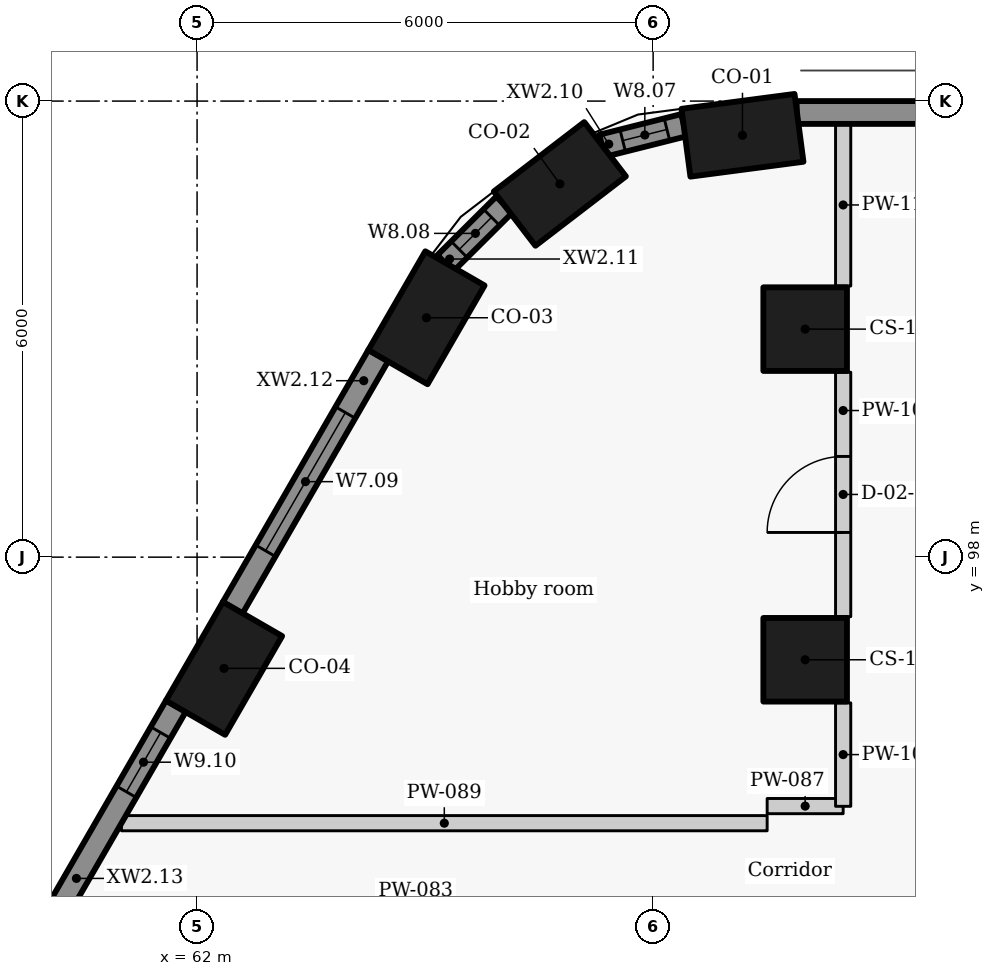
"""IFC4 building model, lengths in metres.
Left out: names, types, materials, properties, quantities, classifications, styles, units other than length and angle.
Written with IfcOpenShell. Run it as: python <this file> out.ifc"""

import sys

from ifc_helpers import new_model, si_unit, direction, frame, frame_2d, origin, origin_2d, place, context, subcontext, project, spatial, rectangle, extrude, element, fill, save


model = new_model("IFC4")
c1 = context("Model", 3, precision=1e-05, world=origin(), true_north=direction((0.0, 1.0)))
c2 = subcontext(c1, "Body", "Model", "MODEL_VIEW")
j1 = project(units=[si_unit("LENGTHUNIT", "METRE"), si_unit("PLANEANGLEUNIT", "RADIAN")], contexts=[c1])
p1 = place(None, origin())
s1 = spatial("IfcSite", under=j1, at=p1, CompositionType="ELEMENT")
p2 = place(p1, origin())
s2 = spatial("IfcBuilding", under=s1, at=p2, CompositionType="ELEMENT")
p3 = place(p2, frame((0.0, 0.0, 51.3)))
s3 = spatial("IfcBuildingStorey", under=s2, at=p3, CompositionType="ELEMENT", Elevation=51.3)
for number, where, z_axis, x_axis in (
    (1, (69.175, 103.55, 0.0), (0.0, 0.0, 1.0), (-0.991, -0.131, 0.0)),
    (2, (66.773, 102.91, 0.0), (0.0, 0.0, 1.0), (-0.793, -0.609, 0.0)),
    (3, (65.018, 101.149, 0.0), (0.0, 0.0, 1.0), (-0.5, -0.866, 0.0)),
    (4, (62.354, 96.537, 0.0), (0.0, 0.0, 1.0), (-0.5, -0.866, 0.0)),
):
    element("IfcColumn", number, at=place(p3, frame(where, z_axis=z_axis, x_axis=x_axis)), inside=s3, PredefinedType="COLUMN", context=c2, shape_type="SweptSolid", body=[
        extrude(rectangle(XDim=1.5, YDim=0.9, at=origin_2d()), origin(), (0.0, 0.0, 1.0), 3.3),
    ])
for number, where, z_axis, x_axis in (
    (5, (70.0, 101.0, 0.0), (0.0, 0.0, 1.0), (0.0, -1.0, 0.0)),
    (6, (70.0, 96.65, 0.0), (0.0, 0.0, 1.0), (0.0, -1.0, 0.0)),
):
    element("IfcColumn", number, at=place(p3, frame(where, z_axis=z_axis, x_axis=x_axis)), inside=s3, PredefinedType="COLUMN", context=c2, shape_type="SweptSolid", body=[
        extrude(rectangle(XDim=1.1, YDim=1.1, at=origin_2d()), origin(), (0.0, 0.0, 1.0), 3.3),
    ])
p4 = place(p3, frame((90.079, 103.85, 0.0), z_axis=(0.0, 0.0, 1.0), x_axis=(-1.0, 0.0, 0.0)))
e7 = element("IfcWall", 7, at=p4, inside=s3, PredefinedType="SOLIDWALL", context=c2, shape_type="SweptSolid", body=[
    extrude(rectangle(XDim=20.19, YDim=0.3, at=frame_2d((10.095, 0.0))), origin(), (0.0, 0.0, 1.0), 2.425),
])
p5 = place(p3, frame((68.405, 103.683, 0.0), z_axis=(0.0, 0.0, 1.0), x_axis=(-0.969766298956, -0.244035500304, 0.0)))
e8 = element("IfcWall", 8, at=p5, inside=s3, PredefinedType="SOLIDWALL", context=c2, shape_type="SweptSolid", body=[
    extrude(rectangle(XDim=1.111, YDim=0.3, at=frame_2d((0.555, 0.0))), origin(), (0.0, 0.0, 1.0), 2.425),
])
p6 = place(p5, frame((0.231, 0.0, 0.9)))
e9 = element("IfcOpeningElement", 9, at=p6, cuts=e8, PredefinedType="OPENING", context=c2, shape_type="SweptSolid", body=[
    extrude(rectangle(XDim=0.6, YDim=1.1, at=frame_2d((0.3, 0.55))), frame((0.0, 0.16, 0.0), z_axis=(0.0, -1.0, 0.0), x_axis=(1.0, 0.0, 0.0)), (0.0, 0.0, 1.0), 0.32),
])
p7 = place(p3, frame((66.042, 102.637, 0.0), z_axis=(0.0, 0.0, 1.0), x_axis=(-0.708892395813, -0.705316646024, 0.0)))
e10 = element("IfcWall", 10, at=p7, inside=s3, PredefinedType="SOLIDWALL", context=c2, shape_type="SweptSolid", body=[
    extrude(rectangle(XDim=1.093, YDim=0.3, at=frame_2d((0.546, 0.0))), origin(), (0.0, 0.0, 1.0), 2.425),
])
p8 = place(p7, frame((0.236, 0.0, 0.9)))
e11 = element("IfcOpeningElement", 11, at=p8, cuts=e10, PredefinedType="OPENING", context=c2, shape_type="SweptSolid", body=[
    extrude(rectangle(XDim=0.6, YDim=1.1, at=frame_2d((0.3, 0.55))), frame((0.0, 0.16, 0.0), z_axis=(0.0, -1.0, 0.0), x_axis=(1.0, 0.0, 0.0)), (0.0, 0.0, 1.0), 0.32),
])
p9 = place(p3, frame((64.385, 100.654, 0.0), z_axis=(0.0, 0.0, 1.0), x_axis=(-0.499974163209, -0.866040320149, 0.0)))
e12 = element("IfcWall", 12, at=p9, inside=s3, PredefinedType="SOLIDWALL", context=c2, shape_type="SweptSolid", body=[
    extrude(rectangle(XDim=3.834, YDim=0.3, at=frame_2d((1.917, 0.0))), origin(), (0.0, 0.0, 1.0), 2.425),
])
p10 = place(p9, frame((0.867, 0.0, 0.9)))
e13 = element("IfcOpeningElement", 13, at=p10, cuts=e12, PredefinedType="OPENING", context=c2, shape_type="SweptSolid", body=[
    extrude(rectangle(XDim=2.1, YDim=1.1, at=frame_2d((1.05, 0.55))), frame((0.0, 0.16, 0.0), z_axis=(0.0, -1.0, 0.0), x_axis=(1.0, 0.0, 0.0)), (0.0, 0.0, 1.0), 0.32),
])
p11 = place(p3, frame((61.722, 96.041, 0.0), z_axis=(0.0, 0.0, 1.0), x_axis=(-0.500001735503, -0.866024401789, 0.0)))
e14 = element("IfcWall", 14, at=p11, inside=s3, PredefinedType="SOLIDWALL", context=c2, shape_type="SweptSolid", body=[
    extrude(rectangle(XDim=3.834, YDim=0.3, at=frame_2d((1.917, 0.0))), origin(), (0.0, 0.0, 1.0), 2.425),
])
p12 = place(p11, frame((0.403, 0.0, 0.9)))
e15 = element("IfcOpeningElement", 15, at=p12, cuts=e14, PredefinedType="OPENING", context=c2, shape_type="SweptSolid", body=[
    extrude(rectangle(XDim=0.9, YDim=1.1, at=frame_2d((0.45, 0.55))), frame((0.0, 0.16, 0.0), z_axis=(0.0, -1.0, 0.0), x_axis=(1.0, 0.0, 0.0)), (0.0, 0.0, 1.0), 0.32),
])
p13 = place(p3, frame((69.5, 94.725, 0.0), z_axis=(0.0, 0.0, 1.0), x_axis=(1.0, 0.0, 0.0)))
e16 = element("IfcWall", 16, at=p13, inside=s3, PredefinedType="PARTITIONING", context=c2, shape_type="SweptSolid", body=[
    extrude(rectangle(XDim=1.0, YDim=0.2, at=frame_2d((0.5, 0.0))), origin(), (0.0, 0.0, 1.0), 2.505),
])
p14 = place(p3, frame((61.005, 94.5, 0.0), z_axis=(0.0, 0.0, 1.0), x_axis=(1.0, 0.0, 0.0)))
e17 = element("IfcWall", 17, at=p14, inside=s3, PredefinedType="PARTITIONING", context=c2, shape_type="SweptSolid", body=[
    extrude(rectangle(XDim=8.495, YDim=0.2, at=frame_2d((4.248, 0.0))), origin(), (0.0, 0.0, 1.0), 2.405),
])
p15 = place(p3, frame((70.5, 94.722, 0.0), z_axis=(0.0, 0.0, 1.0), x_axis=(0.0, 1.0, 0.0)))
e18 = element("IfcWall", 18, at=p15, inside=s3, PredefinedType="PARTITIONING", context=c2, shape_type="SweptSolid", body=[
    extrude(rectangle(XDim=1.361, YDim=0.2, at=frame_2d((0.681, 0.0))), origin(), (0.0, 0.0, 1.0), 3.025),
])
p16 = place(p3, frame((70.5, 97.217, 0.0), z_axis=(0.0, 0.0, 1.0), x_axis=(0.0, 1.0, 0.0)))
e19 = element("IfcWall", 19, at=p16, inside=s3, PredefinedType="PARTITIONING", context=c2, shape_type="SweptSolid", body=[
    extrude(rectangle(XDim=3.216, YDim=0.2, at=frame_2d((1.608, 0.0))), origin(), (0.0, 0.0, 1.0), 3.025),
])
p17 = place(p16, frame((1.108, 0.0, 0.0)))
e20 = element("IfcOpeningElement", 20, at=p17, cuts=e19, PredefinedType="OPENING", context=c2, shape_type="SweptSolid", body=[
    extrude(rectangle(XDim=1.0, YDim=2.1, at=frame_2d((0.5, 1.05))), frame((0.0, 0.11, 0.0), z_axis=(0.0, -1.0, 0.0), x_axis=(1.0, 0.0, 0.0)), (0.0, 0.0, 1.0), 0.22),
])
p18 = place(p3, frame((70.5, 101.567, 0.0), z_axis=(0.0, 0.0, 1.0), x_axis=(0.0, 1.0, 0.0)))
e21 = element("IfcWall", 21, at=p18, inside=s3, PredefinedType="PARTITIONING", context=c2, shape_type="SweptSolid", body=[
    extrude(rectangle(XDim=2.133, YDim=0.2, at=frame_2d((1.066, 0.0))), origin(), (0.0, 0.0, 1.0), 3.025),
])
p19 = place(p6, origin())
e22 = element("IfcWindow", 22, at=p19, inside=s3, PartitioningType="SINGLE_PANEL", PredefinedType="WINDOW", context=c2, shape_type="SweptSolid", body=[
    extrude(rectangle(XDim=0.6, YDim=1.1, at=frame_2d((0.3, 0.55))), frame((0.0, 0.03, 0.0), z_axis=(0.0, -1.0, 0.0), x_axis=(1.0, 0.0, 0.0)), (0.0, 0.0, 1.0), 0.06),
])
fill(e9, e22)
p20 = place(p8, origin())
e23 = element("IfcWindow", 23, at=p20, inside=s3, PartitioningType="SINGLE_PANEL", PredefinedType="WINDOW", context=c2, shape_type="SweptSolid", body=[
    extrude(rectangle(XDim=0.6, YDim=1.1, at=frame_2d((0.3, 0.55))), frame((0.0, 0.03, 0.0), z_axis=(0.0, -1.0, 0.0), x_axis=(1.0, 0.0, 0.0)), (0.0, 0.0, 1.0), 0.06),
])
fill(e11, e23)
p21 = place(p10, origin())
e24 = element("IfcWindow", 24, at=p21, inside=s3, PartitioningType="SINGLE_PANEL", PredefinedType="WINDOW", context=c2, shape_type="SweptSolid", body=[
    extrude(rectangle(XDim=2.1, YDim=1.1, at=frame_2d((1.05, 0.55))), frame((0.0, 0.03, 0.0), z_axis=(0.0, -1.0, 0.0), x_axis=(1.0, 0.0, 0.0)), (0.0, 0.0, 1.0), 0.06),
])
fill(e13, e24)
p22 = place(p12, origin())
e25 = element("IfcWindow", 25, at=p22, inside=s3, PartitioningType="SINGLE_PANEL", PredefinedType="WINDOW", context=c2, shape_type="SweptSolid", body=[
    extrude(rectangle(XDim=0.9, YDim=1.1, at=frame_2d((0.45, 0.55))), frame((0.0, 0.03, 0.0), z_axis=(0.0, -1.0, 0.0), x_axis=(1.0, 0.0, 0.0)), (0.0, 0.0, 1.0), 0.06),
])
fill(e15, e25)
p23 = place(p17, origin())
e26 = element("IfcDoor", 26, at=p23, inside=s3, OperationType="SINGLE_SWING_LEFT", PredefinedType="DOOR", context=c2, shape_type="SweptSolid", body=[
    extrude(rectangle(XDim=1.0, YDim=2.1, at=frame_2d((0.5, 1.05))), frame((0.0, 0.025, 0.0), z_axis=(0.0, -1.0, 0.0), x_axis=(1.0, 0.0, 0.0)), (0.0, 0.0, 1.0), 0.05),
])
fill(e20, e26)
save(model, sys.argv[1])
